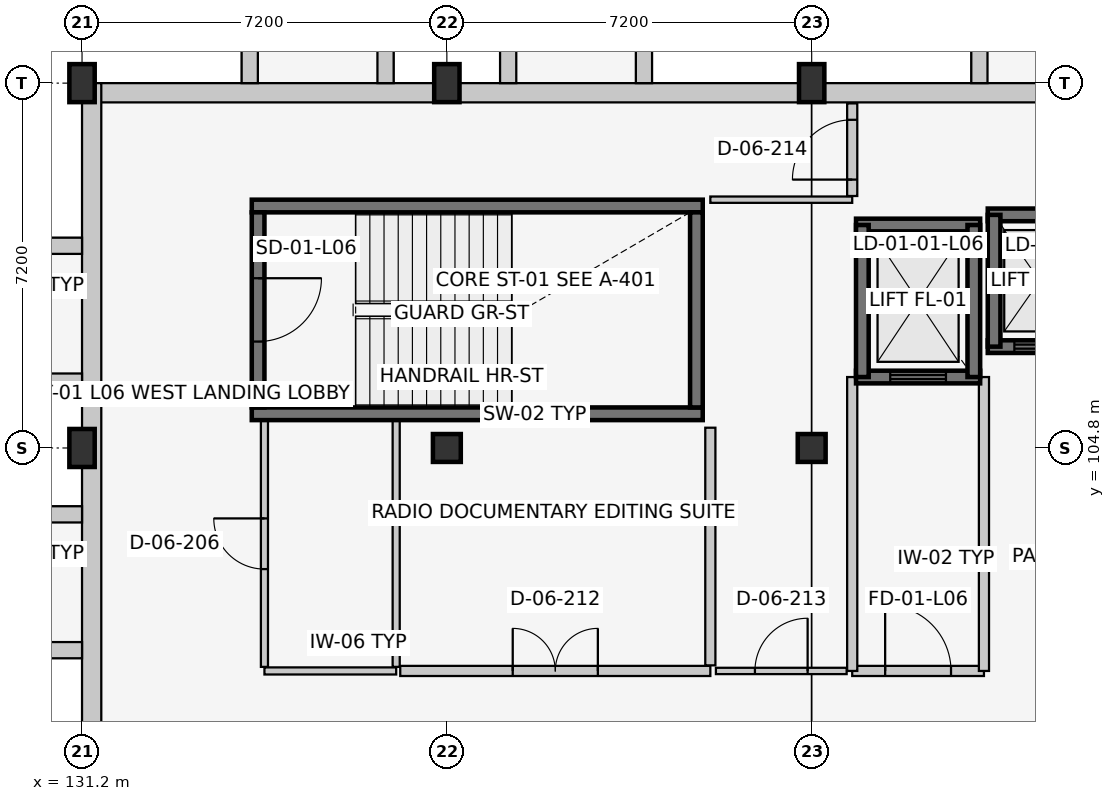
"""IFC4 building model, lengths in metres.
Left out: names, types, materials, properties, quantities, classifications, styles, units other than length and angle.
Written with IfcOpenShell. Run it as: python <this file> out.ifc"""

import sys

from ifc_helpers import new_model, si_unit, direction, frame, frame_2d, origin, origin_2d, place, context, subcontext, project, spatial, rectangle, extrude, element, fill, save


model = new_model("IFC4")
c1 = context("Model", 3, precision=1e-05, world=origin(), true_north=direction((0.0, 1.0)))
c2 = subcontext(c1, "Body", "Model", "MODEL_VIEW")
j1 = project(units=[si_unit("LENGTHUNIT", "METRE"), si_unit("PLANEANGLEUNIT", "RADIAN")], contexts=[c1])
p1 = place(None, origin())
s1 = spatial("IfcSite", under=j1, at=p1, CompositionType="ELEMENT")
p2 = place(p1, origin())
s2 = spatial("IfcBuilding", under=s1, at=p2, CompositionType="ELEMENT")
p3 = place(p2, frame((0.0, 0.0, 25.8)))
s3 = spatial("IfcBuildingStorey", under=s2, at=p3, CompositionType="ELEMENT", Elevation=25.8)
for number, where, z_axis, x_axis in (
    (1, (131.2, 104.8, 0.0), (0.0, 0.0, 1.0), (1.0, 0.0, 0.0)),
    (2, (131.2, 112.0, 0.0), (0.0, 0.0, 1.0), (1.0, 0.0, 0.0)),
):
    element("IfcColumn", number, at=place(p3, frame(where, z_axis=z_axis, x_axis=x_axis)), inside=s3, PredefinedType="COLUMN", context=c2, shape_type="SweptSolid", body=[
        extrude(rectangle(XDim=0.5, YDim=0.75, at=origin_2d()), origin(), (0.0, 0.0, 1.0), 3.9),
    ])
p4 = place(p3, frame((138.4, 104.8, 0.0), z_axis=(0.0, 0.0, 1.0), x_axis=(1.0, 0.0, 0.0)))
e3 = element("IfcColumn", 3, at=p4, inside=s3, PredefinedType="COLUMN", context=c2, shape_type="SweptSolid", body=[
    extrude(rectangle(XDim=0.55, YDim=0.55, at=origin_2d()), origin(), (0.0, 0.0, 1.0), 3.9),
])
p5 = place(p3, frame((138.4, 112.0, 0.0), z_axis=(0.0, 0.0, 1.0), x_axis=(1.0, 0.0, 0.0)))
e4 = element("IfcColumn", 4, at=p5, inside=s3, PredefinedType="COLUMN", context=c2, shape_type="SweptSolid", body=[
    extrude(rectangle(XDim=0.5, YDim=0.75, at=origin_2d()), origin(), (0.0, 0.0, 1.0), 3.9),
])
p6 = place(p3, frame((145.6, 104.8, 0.0), z_axis=(0.0, 0.0, 1.0), x_axis=(1.0, 0.0, 0.0)))
e5 = element("IfcColumn", 5, at=p6, inside=s3, PredefinedType="COLUMN", context=c2, shape_type="SweptSolid", body=[
    extrude(rectangle(XDim=0.55, YDim=0.55, at=origin_2d()), origin(), (0.0, 0.0, 1.0), 3.9),
])
p7 = place(p3, frame((145.6, 112.0, 0.0), z_axis=(0.0, 0.0, 1.0), x_axis=(1.0, 0.0, 0.0)))
e6 = element("IfcColumn", 6, at=p7, inside=s3, PredefinedType="COLUMN", context=c2, shape_type="SweptSolid", body=[
    extrude(rectangle(XDim=0.5, YDim=0.75, at=origin_2d()), origin(), (0.0, 0.0, 1.0), 3.9),
])
p8 = place(p3, frame((131.2, 111.81, 0.0), z_axis=(0.0, 0.0, 1.0), x_axis=(1.0, 0.0, 0.0)))
e7 = element("IfcWall", 7, at=p8, inside=s3, PredefinedType="SOLIDWALL", context=c2, shape_type="SweptSolid", body=[
    extrude(rectangle(XDim=28.8, YDim=0.38, at=frame_2d((14.4, 0.0))), origin(), (0.0, 0.0, 1.0), 2.945),
])
p9 = place(p3, frame((134.51, 112.0, 0.0), z_axis=(0.0, 0.0, 1.0), x_axis=(0.0, 1.0, 0.0)))
e8 = element("IfcWall", 8, at=p9, inside=s3, PredefinedType="SOLIDWALL", context=c2, shape_type="SweptSolid", body=[
    extrude(rectangle(XDim=1.35, YDim=0.32, at=frame_2d((0.675, 0.0))), origin(), (0.0, 0.0, 1.0), 3.63),
])
for number, where, z_axis, x_axis in (
    (9, (137.19, 112.0, 0.0), (0.0, 0.0, 1.0), (0.0, 1.0, 0.0)),
    (10, (139.61, 112.0, 0.0), (0.0, 0.0, 1.0), (0.0, 1.0, 0.0)),
):
    element("IfcWall", number, at=place(p3, frame(where, z_axis=z_axis, x_axis=x_axis)), inside=s3, PredefinedType="SOLIDWALL", context=c2, shape_type="SweptSolid", body=[
        extrude(rectangle(XDim=1.793, YDim=0.32, at=frame_2d((0.896, 0.0))), origin(), (0.0, 0.0, 1.0), 3.63),
    ])
for number, where, z_axis, x_axis in (
    (11, (142.29, 112.0, 0.0), (0.0, 0.0, 1.0), (0.0, 1.0, 0.0)),
    (12, (148.91, 112.0, 0.0), (0.0, 0.0, 1.0), (0.0, 1.0, 0.0)),
):
    element("IfcWall", number, at=place(p3, frame(where, z_axis=z_axis, x_axis=x_axis)), inside=s3, PredefinedType="SOLIDWALL", context=c2, shape_type="SweptSolid", body=[
        extrude(rectangle(XDim=1.35, YDim=0.32, at=frame_2d((0.675, 0.0))), origin(), (0.0, 0.0, 1.0), 3.63),
    ])
p10 = place(p3, frame((131.39, 83.2, 0.0), z_axis=(0.0, 0.0, 1.0), x_axis=(0.0, 1.0, 0.0)))
e13 = element("IfcWall", 13, at=p10, inside=s3, PredefinedType="SOLIDWALL", context=c2, shape_type="SweptSolid", body=[
    extrude(rectangle(XDim=28.8, YDim=0.38, at=frame_2d((14.4, 0.0))), origin(), (0.0, 0.0, 1.0), 3.045),
])
p11 = place(p10, frame((10.1, 0.0, 0.0)))
e14 = element("IfcOpeningElement", 14, at=p11, cuts=e13, PredefinedType="OPENING", context=c2, shape_type="SweptSolid", body=[
    extrude(rectangle(XDim=1.4, YDim=2.2, at=frame_2d((0.7, 1.1))), frame((0.0, 0.202, 0.0), z_axis=(0.0, -1.0, 0.0), x_axis=(1.0, 0.0, 0.0)), (0.0, 0.0, 1.0), 0.404),
])
p12 = place(p3, frame((131.2, 100.81, 0.0), z_axis=(0.0, 0.0, 1.0), x_axis=(-1.0, 0.0, 0.0)))
e15 = element("IfcWall", 15, at=p12, inside=s3, PredefinedType="SOLIDWALL", context=c2, shape_type="SweptSolid", body=[
    extrude(rectangle(XDim=1.35, YDim=0.32, at=frame_2d((0.675, 0.0))), origin(), (0.0, 0.0, 1.0), 3.63),
])
for number, where, z_axis, x_axis in (
    (16, (131.2, 103.49, 0.0), (0.0, 0.0, 1.0), (-1.0, 0.0, 0.0)),
    (17, (131.2, 106.11, 0.0), (0.0, 0.0, 1.0), (-1.0, 0.0, 0.0)),
):
    element("IfcWall", number, at=place(p3, frame(where, z_axis=z_axis, x_axis=x_axis)), inside=s3, PredefinedType="SOLIDWALL", context=c2, shape_type="SweptSolid", body=[
        extrude(rectangle(XDim=1.793, YDim=0.32, at=frame_2d((0.896, 0.0))), origin(), (0.0, 0.0, 1.0), 3.63),
    ])
p13 = place(p3, frame((131.2, 108.79, 0.0), z_axis=(0.0, 0.0, 1.0), x_axis=(-1.0, 0.0, 0.0)))
e18 = element("IfcWall", 18, at=p13, inside=s3, PredefinedType="SOLIDWALL", context=c2, shape_type="SweptSolid", body=[
    extrude(rectangle(XDim=1.35, YDim=0.32, at=frame_2d((0.675, 0.0))), origin(), (0.0, 0.0, 1.0), 3.63),
])
for number, where, z_axis, x_axis in (
    (19, (134.55, 105.475, 0.0), (0.0, 0.0, 1.0), (1.0, 0.0, 0.0)),
    (20, (143.45, 109.575, 0.0), (0.0, 0.0, 1.0), (-1.0, 0.0, 0.0)),
):
    element("IfcWall", number, at=place(p3, frame(where, z_axis=z_axis, x_axis=x_axis)), inside=s3, PredefinedType="SHEAR", context=c2, shape_type="SweptSolid", body=[
        extrude(rectangle(XDim=8.9, YDim=0.25, at=frame_2d((4.45, 0.0))), origin(), (0.0, 0.0, 1.0), 3.65),
    ])
p14 = place(p3, frame((134.675, 109.45, 0.0), z_axis=(0.0, 0.0, 1.0), x_axis=(0.0, -1.0, 0.0)))
e21 = element("IfcWall", 21, at=p14, inside=s3, PredefinedType="SHEAR", context=c2, shape_type="SweptSolid", body=[
    extrude(rectangle(XDim=3.85, YDim=0.25, at=frame_2d((1.925, 0.0))), origin(), (0.0, 0.0, 1.0), 3.65),
])
p15 = place(p14, frame((1.3, 0.0, 0.0)))
e22 = element("IfcOpeningElement", 22, at=p15, cuts=e21, PredefinedType="OPENING", context=c2, shape_type="SweptSolid", body=[
    extrude(rectangle(XDim=1.25, YDim=2.15, at=frame_2d((0.625, 1.075))), frame((0.0, 0.137, 0.0), z_axis=(0.0, -1.0, 0.0), x_axis=(1.0, 0.0, 0.0)), (0.0, 0.0, 1.0), 0.274),
])
p16 = place(p3, frame((143.325, 105.6, 0.0), z_axis=(0.0, 0.0, 1.0), x_axis=(0.0, 1.0, 0.0)))
e23 = element("IfcWall", 23, at=p16, inside=s3, PredefinedType="SHEAR", context=c2, shape_type="SweptSolid", body=[
    extrude(rectangle(XDim=3.85, YDim=0.25, at=frame_2d((1.925, 0.0))), origin(), (0.0, 0.0, 1.0), 3.65),
])
p17 = place(p3, frame((146.475, 106.2, 0.0), z_axis=(0.0, 0.0, 1.0), x_axis=(1.0, 0.0, 0.0)))
e24 = element("IfcWall", 24, at=p17, inside=s3, PredefinedType="SHEAR", context=c2, shape_type="SweptSolid", body=[
    extrude(rectangle(XDim=2.45, YDim=0.25, at=frame_2d((1.225, 0.0))), origin(), (0.0, 0.0, 1.0), 3.65),
])
p18 = place(p17, frame((0.675, 0.0, 0.0)))
e25 = element("IfcOpeningElement", 25, at=p18, cuts=e24, PredefinedType="OPENING", context=c2, shape_type="SweptSolid", body=[
    extrude(rectangle(XDim=1.1, YDim=2.15, at=frame_2d((0.55, 1.075))), frame((0.0, 0.137, 0.0), z_axis=(0.0, -1.0, 0.0), x_axis=(1.0, 0.0, 0.0)), (0.0, 0.0, 1.0), 0.274),
])
p19 = place(p3, frame((148.925, 109.2, 0.0), z_axis=(0.0, 0.0, 1.0), x_axis=(-1.0, 0.0, 0.0)))
e26 = element("IfcWall", 26, at=p19, inside=s3, PredefinedType="SHEAR", context=c2, shape_type="SweptSolid", body=[
    extrude(rectangle(XDim=2.45, YDim=0.25, at=frame_2d((1.225, 0.0))), origin(), (0.0, 0.0, 1.0), 3.65),
])
for number, where, z_axis, x_axis in (
    (27, (146.6, 109.2, 0.0), (0.0, 0.0, 1.0), (0.0, -1.0, 0.0)),
    (28, (148.8, 106.2, 0.0), (0.0, 0.0, 1.0), (0.0, 1.0, 0.0)),
):
    element("IfcWall", number, at=place(p3, frame(where, z_axis=z_axis, x_axis=x_axis)), inside=s3, PredefinedType="SHEAR", context=c2, shape_type="SweptSolid", body=[
        extrude(rectangle(XDim=3.0, YDim=0.25, at=frame_2d((1.5, 0.0))), origin(), (0.0, 0.0, 1.0), 3.65),
    ])
p20 = place(p3, frame((146.4, 100.4, 0.0), z_axis=(0.0, 0.0, 1.0), x_axis=(1.0, 0.0, 0.0)))
e29 = element("IfcWall", 29, at=p20, inside=s3, PredefinedType="PARTITIONING", context=c2, shape_type="SweptSolid", body=[
    extrude(rectangle(XDim=2.6, YDim=0.2, at=frame_2d((1.3, 0.0))), origin(), (0.0, 0.0, 1.0), 3.65),
])
p21 = place(p20, frame((0.65, 0.0, 0.0)))
e30 = element("IfcOpeningElement", 30, at=p21, cuts=e29, PredefinedType="OPENING", context=c2, shape_type="SweptSolid", body=[
    extrude(rectangle(XDim=1.3, YDim=2.2, at=frame_2d((0.65, 1.1))), frame((0.0, 0.112, 0.0), z_axis=(0.0, -1.0, 0.0), x_axis=(1.0, 0.0, 0.0)), (0.0, 0.0, 1.0), 0.224),
])
p22 = place(p3, frame((146.4, 106.2, 0.0), z_axis=(0.0, 0.0, 1.0), x_axis=(0.0, -1.0, 0.0)))
e31 = element("IfcWall", 31, at=p22, inside=s3, PredefinedType="PARTITIONING", context=c2, shape_type="SweptSolid", body=[
    extrude(rectangle(XDim=5.8, YDim=0.2, at=frame_2d((2.9, 0.0))), origin(), (0.0, 0.0, 1.0), 3.65),
])
p23 = place(p3, frame((149.0, 100.4, 0.0), z_axis=(0.0, 0.0, 1.0), x_axis=(0.0, 1.0, 0.0)))
e32 = element("IfcWall", 32, at=p23, inside=s3, PredefinedType="PARTITIONING", context=c2, shape_type="SweptSolid", body=[
    extrude(rectangle(XDim=5.8, YDim=0.2, at=frame_2d((2.9, 0.0))), origin(), (0.0, 0.0, 1.0), 3.395),
])
p24 = place(p3, frame((149.075, 106.8, 0.0), z_axis=(0.0, 0.0, 1.0), x_axis=(1.0, 0.0, 0.0)))
e33 = element("IfcWall", 33, at=p24, inside=s3, PredefinedType="SHEAR", context=c2, shape_type="SweptSolid", body=[
    extrude(rectangle(XDim=2.05, YDim=0.25, at=frame_2d((1.025, 0.0))), origin(), (0.0, 0.0, 1.0), 3.65),
])
p25 = place(p24, frame((0.525, 0.0, 0.0)))
e34 = element("IfcOpeningElement", 34, at=p25, cuts=e33, PredefinedType="OPENING", context=c2, shape_type="SweptSolid", body=[
    extrude(rectangle(XDim=1.0, YDim=2.15, at=frame_2d((0.5, 1.075))), frame((0.0, 0.137, 0.0), z_axis=(0.0, -1.0, 0.0), x_axis=(1.0, 0.0, 0.0)), (0.0, 0.0, 1.0), 0.274),
])
p26 = place(p3, frame((151.125, 109.4, 0.0), z_axis=(0.0, 0.0, 1.0), x_axis=(-1.0, 0.0, 0.0)))
e35 = element("IfcWall", 35, at=p26, inside=s3, PredefinedType="SHEAR", context=c2, shape_type="SweptSolid", body=[
    extrude(rectangle(XDim=2.05, YDim=0.25, at=frame_2d((1.025, 0.0))), origin(), (0.0, 0.0, 1.0), 3.65),
])
p27 = place(p3, frame((149.2, 109.4, 0.0), z_axis=(0.0, 0.0, 1.0), x_axis=(0.0, -1.0, 0.0)))
e36 = element("IfcWall", 36, at=p27, inside=s3, PredefinedType="SHEAR", context=c2, shape_type="SweptSolid", body=[
    extrude(rectangle(XDim=2.6, YDim=0.25, at=frame_2d((1.3, 0.0))), origin(), (0.0, 0.0, 1.0), 3.65),
])
p28 = place(p3, frame((134.8, 100.4, 0.0), z_axis=(0.0, 0.0, 1.0), x_axis=(1.0, 0.0, 0.0)))
e37 = element("IfcWall", 37, at=p28, inside=s3, PredefinedType="PARTITIONING", context=c2, shape_type="SweptSolid", body=[
    extrude(rectangle(XDim=2.6, YDim=0.14, at=frame_2d((1.3, 0.0))), origin(), (0.0, 0.0, 1.0), 3.65),
])
p29 = place(p3, frame((134.8, 100.48, 0.0), z_axis=(0.0, 0.0, 1.0), x_axis=(0.0, 1.0, 0.0)))
e38 = element("IfcWall", 38, at=p29, inside=s3, PredefinedType="PARTITIONING", context=c2, shape_type="SweptSolid", body=[
    extrude(rectangle(XDim=4.86, YDim=0.14, at=frame_2d((2.43, 0.0))), origin(), (0.0, 0.0, 1.0), 3.075),
])
p30 = place(p29, frame((1.93, 0.0, 0.0)))
e39 = element("IfcOpeningElement", 39, at=p30, cuts=e38, PredefinedType="OPENING", context=c2, shape_type="SweptSolid", body=[
    extrude(rectangle(XDim=1.0, YDim=2.1, at=frame_2d((0.5, 1.05))), frame((0.0, 0.082, 0.0), z_axis=(0.0, -1.0, 0.0), x_axis=(1.0, 0.0, 0.0)), (0.0, 0.0, 1.0), 0.164),
])
p31 = place(p3, frame((137.4, 100.48, 0.0), z_axis=(0.0, 0.0, 1.0), x_axis=(0.0, 1.0, 0.0)))
e40 = element("IfcWall", 40, at=p31, inside=s3, PredefinedType="PARTITIONING", context=c2, shape_type="SweptSolid", body=[
    extrude(rectangle(XDim=4.86, YDim=0.14, at=frame_2d((2.43, 0.0))), origin(), (0.0, 0.0, 1.0), 3.65),
])
p32 = place(p3, frame((137.48, 100.4, 0.0), z_axis=(0.0, 0.0, 1.0), x_axis=(1.0, 0.0, 0.0)))
e41 = element("IfcWall", 41, at=p32, inside=s3, PredefinedType="PARTITIONING", context=c2, shape_type="SweptSolid", body=[
    extrude(rectangle(XDim=6.12, YDim=0.2, at=frame_2d((3.06, 0.0))), origin(), (0.0, 0.0, 1.0), 3.65),
])
p33 = place(p32, frame((2.22, 0.0, 0.0)))
e42 = element("IfcOpeningElement", 42, at=p33, cuts=e41, PredefinedType="OPENING", context=c2, shape_type="SweptSolid", body=[
    extrude(rectangle(XDim=1.68, YDim=2.3, at=frame_2d((0.84, 1.15))), frame((0.0, 0.112, 0.0), z_axis=(0.0, -1.0, 0.0), x_axis=(1.0, 0.0, 0.0)), (0.0, 0.0, 1.0), 0.224),
])
p34 = place(p3, frame((143.6, 100.51, 0.0), z_axis=(0.0, 0.0, 1.0), x_axis=(0.0, 1.0, 0.0)))
e43 = element("IfcWall", 43, at=p34, inside=s3, PredefinedType="PARTITIONING", context=c2, shape_type="SweptSolid", body=[
    extrude(rectangle(XDim=4.69, YDim=0.2, at=frame_2d((2.345, 0.0))), origin(), (0.0, 0.0, 1.0), 3.65),
])
p35 = place(p3, frame((143.71, 100.4, 0.0), z_axis=(0.0, 0.0, 1.0), x_axis=(1.0, 0.0, 0.0)))
e44 = element("IfcWall", 44, at=p35, inside=s3, PredefinedType="PARTITIONING", context=c2, shape_type="SweptSolid", body=[
    extrude(rectangle(XDim=2.58, YDim=0.125, at=frame_2d((1.29, 0.0))), origin(), (0.0, 0.0, 1.0), 3.65),
])
p36 = place(p35, frame((0.77, 0.0, 0.0)))
e45 = element("IfcOpeningElement", 45, at=p36, cuts=e44, PredefinedType="OPENING", context=c2, shape_type="SweptSolid", body=[
    extrude(rectangle(XDim=1.04, YDim=2.15, at=frame_2d((0.52, 1.075))), frame((0.0, 0.074, 0.0), z_axis=(0.0, -1.0, 0.0), x_axis=(1.0, 0.0, 0.0)), (0.0, 0.0, 1.0), 0.149),
])
p37 = place(p3, frame((143.6, 109.7, 0.0), z_axis=(0.0, 0.0, 1.0), x_axis=(1.0, 0.0, 0.0)))
e46 = element("IfcWall", 46, at=p37, inside=s3, PredefinedType="PARTITIONING", context=c2, shape_type="SweptSolid", body=[
    extrude(rectangle(XDim=2.8, YDim=0.125, at=frame_2d((1.4, 0.0))), origin(), (0.0, 0.0, 1.0), 3.65),
])
p38 = place(p3, frame((146.4, 109.772, 0.0), z_axis=(0.0, 0.0, 1.0), x_axis=(0.0, 1.0, 0.0)))
e47 = element("IfcWall", 47, at=p38, inside=s3, PredefinedType="PARTITIONING", context=c2, shape_type="SweptSolid", body=[
    extrude(rectangle(XDim=1.828, YDim=0.2, at=frame_2d((0.914, 0.0))), origin(), (0.0, 0.0, 1.0), 3.65),
])
p39 = place(p38, frame((0.324, 0.0, 0.0)))
e48 = element("IfcOpeningElement", 48, at=p39, cuts=e47, PredefinedType="OPENING", context=c2, shape_type="SweptSolid", body=[
    extrude(rectangle(XDim=1.18, YDim=2.2, at=frame_2d((0.59, 1.1))), frame((0.0, 0.112, 0.0), z_axis=(0.0, -1.0, 0.0), x_axis=(1.0, 0.0, 0.0)), (0.0, 0.0, 1.0), 0.224),
])
p40 = place(p15, origin())
e49 = element("IfcDoor", 49, at=p40, inside=s3, OperationType="SINGLE_SWING_LEFT", PredefinedType="DOOR", context=c2, shape_type="SweptSolid", body=[
    extrude(rectangle(XDim=1.25, YDim=2.15, at=frame_2d((0.625, 1.075))), frame((0.0, 0.025, 0.0), z_axis=(0.0, -1.0, 0.0), x_axis=(1.0, 0.0, 0.0)), (0.0, 0.0, 1.0), 0.05),
])
fill(e22, e49)
p41 = place(p18, origin())
e50 = element("IfcDoor", 50, at=p41, inside=s3, OperationType="SLIDING_TO_LEFT", PredefinedType="DOOR", context=c2, shape_type="SweptSolid", body=[
    extrude(rectangle(XDim=1.1, YDim=2.15, at=frame_2d((0.55, 1.075))), frame((0.0, 0.025, 0.0), z_axis=(0.0, -1.0, 0.0), x_axis=(1.0, 0.0, 0.0)), (0.0, 0.0, 1.0), 0.05),
])
fill(e25, e50)
p42 = place(p21, origin())
e51 = element("IfcDoor", 51, at=p42, inside=s3, OperationType="SINGLE_SWING_LEFT", PredefinedType="DOOR", context=c2, shape_type="SweptSolid", body=[
    extrude(rectangle(XDim=1.3, YDim=2.2, at=frame_2d((0.65, 1.1))), frame((0.0, 0.025, 0.0), z_axis=(0.0, -1.0, 0.0), x_axis=(1.0, 0.0, 0.0)), (0.0, 0.0, 1.0), 0.05),
])
fill(e30, e51)
p43 = place(p25, origin())
e52 = element("IfcDoor", 52, at=p43, inside=s3, OperationType="SLIDING_TO_LEFT", PredefinedType="DOOR", context=c2, shape_type="SweptSolid", body=[
    extrude(rectangle(XDim=1.0, YDim=2.15, at=frame_2d((0.5, 1.075))), frame((0.0, 0.025, 0.0), z_axis=(0.0, -1.0, 0.0), x_axis=(1.0, 0.0, 0.0)), (0.0, 0.0, 1.0), 0.05),
])
fill(e34, e52)
p44 = place(p30, origin())
e53 = element("IfcDoor", 53, at=p44, inside=s3, OperationType="SINGLE_SWING_RIGHT", PredefinedType="DOOR", context=c2, shape_type="SweptSolid", body=[
    extrude(rectangle(XDim=1.0, YDim=2.1, at=frame_2d((0.5, 1.05))), frame((0.0, 0.025, 0.0), z_axis=(0.0, -1.0, 0.0), x_axis=(1.0, 0.0, 0.0)), (0.0, 0.0, 1.0), 0.05),
])
fill(e39, e53)
p45 = place(p33, origin())
e54 = element("IfcDoor", 54, at=p45, inside=s3, OperationType="DOUBLE_DOOR_SINGLE_SWING", PredefinedType="DOOR", context=c2, shape_type="SweptSolid", body=[
    extrude(rectangle(XDim=1.68, YDim=2.3, at=frame_2d((0.84, 1.15))), frame((0.0, 0.025, 0.0), z_axis=(0.0, -1.0, 0.0), x_axis=(1.0, 0.0, 0.0)), (0.0, 0.0, 1.0), 0.05),
])
fill(e42, e54)
p46 = place(p36, origin())
e55 = element("IfcDoor", 55, at=p46, inside=s3, OperationType="SINGLE_SWING_RIGHT", PredefinedType="DOOR", context=c2, shape_type="SweptSolid", body=[
    extrude(rectangle(XDim=1.04, YDim=2.15, at=frame_2d((0.52, 1.075))), frame((0.0, 0.025, 0.0), z_axis=(0.0, -1.0, 0.0), x_axis=(1.0, 0.0, 0.0)), (0.0, 0.0, 1.0), 0.05),
])
fill(e45, e55)
p47 = place(p39, origin())
e56 = element("IfcDoor", 56, at=p47, inside=s3, OperationType="SINGLE_SWING_LEFT", PredefinedType="DOOR", context=c2, shape_type="SweptSolid", body=[
    extrude(rectangle(XDim=1.18, YDim=2.2, at=frame_2d((0.59, 1.1))), frame((0.0, 0.025, 0.0), z_axis=(0.0, -1.0, 0.0), x_axis=(1.0, 0.0, 0.0)), (0.0, 0.0, 1.0), 0.05),
])
fill(e48, e56)
save(model, sys.argv[1])
